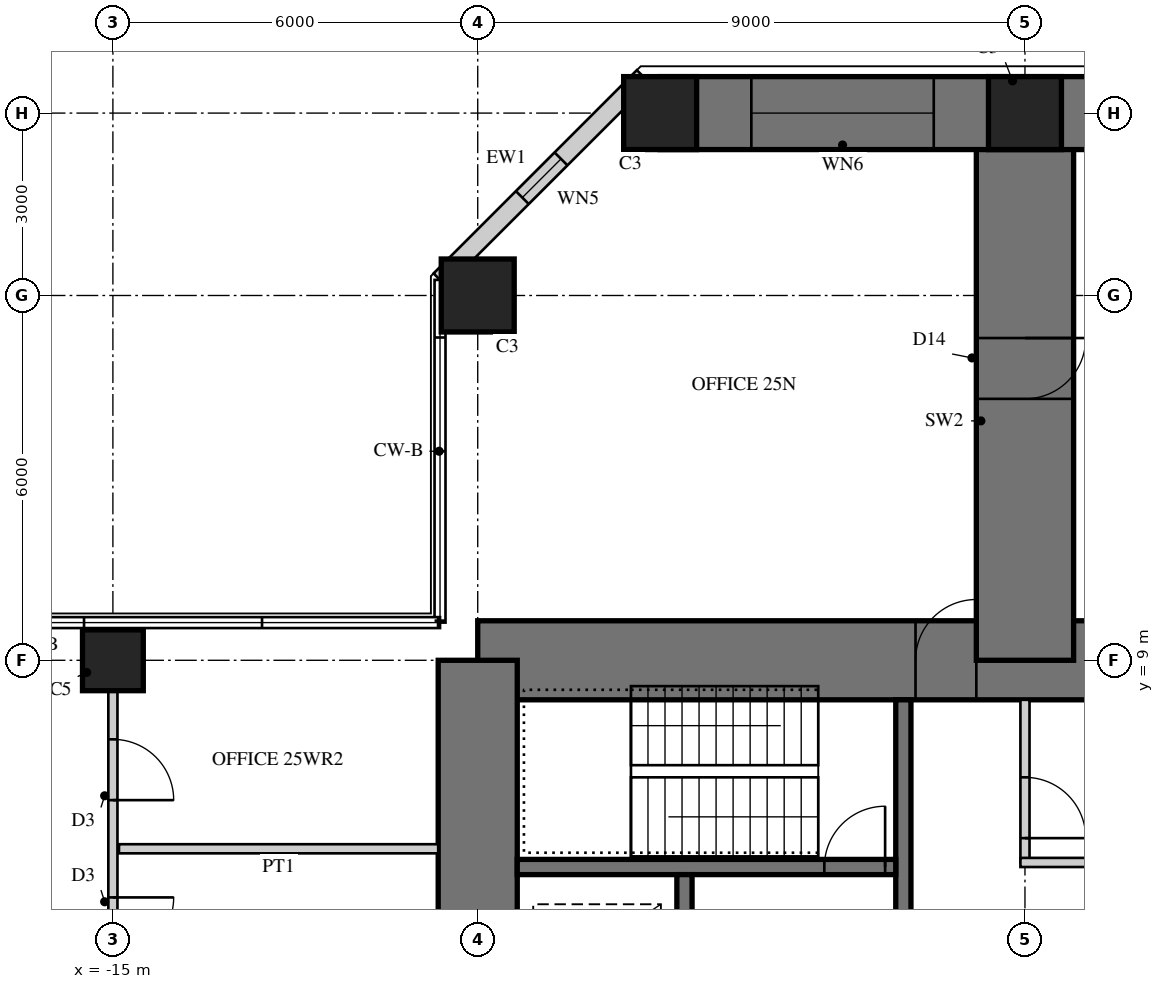
"""IFC4 building model, lengths in metres.
Left out: names, types, materials, properties, quantities, classifications, styles, units other than length and angle.
Written with IfcOpenShell. Run it as: python <this file> out.ifc"""

import sys

from ifc_helpers import new_model, si_unit, direction, frame, frame_2d, origin, origin_2d, place, context, subcontext, project, spatial, rectangle, hollow_rectangle, extrude, element, fill, save


model = new_model("IFC4")
c1 = context("Model", 3, precision=1e-05, world=origin(), true_north=direction((0.0, 1.0)))
c2 = subcontext(c1, "Body", "Model", "MODEL_VIEW")
j1 = project(units=[si_unit("LENGTHUNIT", "METRE"), si_unit("PLANEANGLEUNIT", "RADIAN")], contexts=[c1])
p1 = place(None, origin())
s1 = spatial("IfcSite", under=j1, at=p1, CompositionType="ELEMENT")
p2 = place(p1, origin())
s2 = spatial("IfcBuilding", under=s1, at=p2, CompositionType="ELEMENT")
p3 = place(p2, frame((0.0, 0.0, 104.5)))
s3 = spatial("IfcBuildingStorey", under=s2, at=p3, CompositionType="ELEMENT", Elevation=104.5)
p4 = place(p3, frame((9.0, 9.0, 0.0), z_axis=(0.0, 0.0, 1.0), x_axis=(-1.0, 0.0, 0.0)))
e1 = element("IfcWall", 1, at=p4, inside=s3, PredefinedType="SHEAR", context=c2, shape_type="SweptSolid", body=[
    extrude(rectangle(XDim=18.0, YDim=1.3, at=frame_2d((9.0, 0.0))), origin(), (0.0, 0.0, 1.0), 4.0),
])
p5 = place(p4, frame((9.8, 0.0, 0.0)))
e2 = element("IfcOpeningElement", 2, at=p5, cuts=e1, PredefinedType="OPENING", context=c2, shape_type="SweptSolid", body=[
    extrude(rectangle(XDim=1.0, YDim=2.4, at=frame_2d((0.5, 1.2))), frame((0.0, 0.66, 0.0), z_axis=(0.0, -1.0, 0.0), x_axis=(1.0, 0.0, 0.0)), (0.0, 0.0, 1.0), 1.32),
])
p6 = place(p3, frame((-9.0, 9.0, 0.0), z_axis=(0.0, 0.0, 1.0), x_axis=(0.0, -1.0, 0.0)))
e3 = element("IfcWall", 3, at=p6, inside=s3, PredefinedType="SHEAR", context=c2, shape_type="SweptSolid", body=[
    extrude(rectangle(XDim=18.0, YDim=1.3, at=frame_2d((9.0, 0.0))), origin(), (0.0, 0.0, 1.0), 4.0),
])
p7 = place(p6, frame((9.8, 0.0, 0.0)))
e4 = element("IfcOpeningElement", 4, at=p7, cuts=e3, PredefinedType="OPENING", context=c2, shape_type="SweptSolid", body=[
    extrude(rectangle(XDim=1.0, YDim=2.4, at=frame_2d((0.5, 1.2))), frame((0.0, 0.66, 0.0), z_axis=(0.0, -1.0, 0.0), x_axis=(1.0, 0.0, 0.0)), (0.0, 0.0, 1.0), 1.32),
])
p8 = place(p3, frame((-2.0, 1.675, 0.0), z_axis=(0.0, 0.0, 1.0), x_axis=(0.0, 1.0, 0.0)))
e5 = element("IfcWall", 5, at=p8, inside=s3, PredefinedType="SHEAR", context=c2, shape_type="SweptSolid", body=[
    extrude(rectangle(XDim=6.675, YDim=0.25, at=frame_2d((3.337, 0.0))), origin(), (0.0, 0.0, 1.0), 4.0),
])
p9 = place(p8, frame((0.725, 0.0, 0.0)))
e6 = element("IfcOpeningElement", 6, at=p9, cuts=e5, PredefinedType="OPENING", context=c2, shape_type="SweptSolid", body=[
    extrude(rectangle(XDim=1.0, YDim=2.1, at=frame_2d((0.5, 1.05))), frame((0.0, 0.135, 0.0), z_axis=(0.0, -1.0, 0.0), x_axis=(1.0, 0.0, 0.0)), (0.0, 0.0, 1.0), 0.27),
])
p10 = place(p3, frame((-2.125, 5.6, 0.0), z_axis=(0.0, 0.0, 1.0), x_axis=(-1.0, 0.0, 0.0)))
e7 = element("IfcWall", 7, at=p10, inside=s3, PredefinedType="SHEAR", context=c2, shape_type="SweptSolid", body=[
    extrude(rectangle(XDim=6.225, YDim=0.25, at=frame_2d((3.113, 0.0))), origin(), (0.0, 0.0, 1.0), 4.0),
])
p11 = place(p10, frame((0.175, 0.0, 0.0)))
e8 = element("IfcOpeningElement", 8, at=p11, cuts=e7, PredefinedType="OPENING", context=c2, shape_type="SweptSolid", body=[
    extrude(rectangle(XDim=1.0, YDim=2.1, at=frame_2d((0.5, 1.05))), frame((0.0, 0.135, 0.0), z_axis=(0.0, -1.0, 0.0), x_axis=(1.0, 0.0, 0.0)), (0.0, 0.0, 1.0), 0.27),
])
p12 = place(p3, frame((-5.6, 1.925, 0.0), z_axis=(0.0, 0.0, 1.0), x_axis=(0.0, 1.0, 0.0)))
e9 = element("IfcWall", 9, at=p12, inside=s3, PredefinedType="SHEAR", context=c2, shape_type="SweptSolid", body=[
    extrude(rectangle(XDim=3.55, YDim=0.25, at=frame_2d((1.775, 0.0))), origin(), (0.0, 0.0, 1.0), 4.0),
])
p13 = place(p12, frame((1.525, 0.0, 0.0)))
e10 = element("IfcOpeningElement", 10, at=p13, cuts=e9, PredefinedType="OPENING", context=c2, shape_type="SweptSolid", body=[
    extrude(rectangle(XDim=1.1, YDim=2.2, at=frame_2d((0.55, 1.1))), frame((0.0, 0.135, 0.0), z_axis=(0.0, -1.0, 0.0), x_axis=(1.0, 0.0, 0.0)), (0.0, 0.0, 1.0), 0.27),
])
p14 = place(p12, frame((0.075, 0.0, 0.0)))
e11 = element("IfcOpeningElement", 11, at=p14, cuts=e9, PredefinedType="OPENING", context=c2, shape_type="SweptSolid", body=[
    extrude(rectangle(XDim=0.8, YDim=2.1, at=frame_2d((0.4, 1.05))), frame((0.0, 0.135, 0.0), z_axis=(0.0, -1.0, 0.0), x_axis=(1.0, 0.0, 0.0)), (0.0, 0.0, 1.0), 0.27),
])
p15 = place(p3, frame((0.0, 9.0, 0.0), z_axis=(0.0, 0.0, 1.0), x_axis=(0.0, 1.0, 0.0)))
e12 = element("IfcWall", 12, at=p15, inside=s3, PredefinedType="SHEAR", context=c2, shape_type="SweptSolid", body=[
    extrude(rectangle(XDim=9.0, YDim=1.6, at=frame_2d((4.5, 0.0))), origin(), (0.0, 0.0, 1.0), 4.0),
])
p16 = place(p15, frame((4.3, 0.0, 0.0)))
e13 = element("IfcOpeningElement", 13, at=p16, cuts=e12, PredefinedType="OPENING", context=c2, shape_type="SweptSolid", body=[
    extrude(rectangle(XDim=1.0, YDim=2.2, at=frame_2d((0.5, 1.1))), frame((0.0, 0.81, 0.0), z_axis=(0.0, -1.0, 0.0), x_axis=(1.0, 0.0, 0.0)), (0.0, 0.0, 1.0), 1.62),
])
p17 = place(p3, frame((6.0, 18.0, 0.0), z_axis=(0.0, 0.0, 1.0), x_axis=(-1.0, 0.0, 0.0)))
e14 = element("IfcWall", 14, at=p17, inside=s3, PredefinedType="SHEAR", context=c2, shape_type="SweptSolid", body=[
    extrude(rectangle(XDim=12.0, YDim=1.2, at=frame_2d((6.0, 0.0))), origin(), (0.0, 0.0, 1.0), 4.0),
])
p18 = place(p17, frame((1.5, 0.0, 0.6)))
e15 = element("IfcOpeningElement", 15, at=p18, cuts=e14, PredefinedType="OPENING", context=c2, shape_type="SweptSolid", body=[
    extrude(rectangle(XDim=3.0, YDim=2.4, at=frame_2d((1.5, 1.2))), frame((0.0, 0.61, 0.0), z_axis=(0.0, -1.0, 0.0), x_axis=(1.0, 0.0, 0.0)), (0.0, 0.0, 1.0), 1.22),
])
p19 = place(p17, frame((7.5, 0.0, 0.6)))
e16 = element("IfcOpeningElement", 16, at=p19, cuts=e14, PredefinedType="OPENING", context=c2, shape_type="SweptSolid", body=[
    extrude(rectangle(XDim=3.0, YDim=2.4, at=frame_2d((1.5, 1.2))), frame((0.0, 0.61, 0.0), z_axis=(0.0, -1.0, 0.0), x_axis=(1.0, 0.0, 0.0)), (0.0, 0.0, 1.0), 1.22),
])
for number, where, z_axis, x_axis in (
    (17, (-9.0, 15.0, 0.0), (0.0, 0.0, 1.0), (1.0, 0.0, 0.0)),
    (18, (0.0, 18.0, 0.0), (0.0, 0.0, 1.0), (1.0, 0.0, 0.0)),
    (19, (-6.0, 18.0, 0.0), (0.0, 0.0, 1.0), (1.0, 0.0, 0.0)),
):
    element("IfcColumn", number, at=place(p3, frame(where, z_axis=z_axis, x_axis=x_axis)), inside=s3, PredefinedType="COLUMN", context=c2, shape_type="SweptSolid", body=[
        extrude(rectangle(XDim=1.2, YDim=1.2, at=origin_2d()), origin(), (0.0, 0.0, 1.0), 4.0),
    ])
p20 = place(p3, frame((-15.0, 9.0, 0.0), z_axis=(0.0, 0.0, 1.0), x_axis=(1.0, 0.0, 0.0)))
e20 = element("IfcColumn", 20, at=p20, inside=s3, PredefinedType="COLUMN", context=c2, shape_type="SweptSolid", body=[
    extrude(rectangle(XDim=1.0, YDim=1.0, at=origin_2d()), origin(), (0.0, 0.0, 1.0), 4.0),
])
p21 = place(p3, frame((-6.277, 18.6, 0.0), z_axis=(0.0, 0.0, 1.0), x_axis=(-0.707106781187, -0.707106781187, 0.0)))
e21 = element("IfcWall", 21, at=p21, inside=s3, PredefinedType="SOLIDWALL", context=c2, shape_type="SweptSolid", body=[
    extrude(rectangle(XDim=4.728, YDim=0.3, at=frame_2d((2.364, 0.0))), origin(), (0.0, 0.0, 1.0), 3.8),
])
p22 = place(p21, frame((1.914, 0.0, 0.3)))
e22 = element("IfcOpeningElement", 22, at=p22, cuts=e21, PredefinedType="OPENING", context=c2, shape_type="SweptSolid", body=[
    extrude(rectangle(XDim=0.9, YDim=2.4, at=frame_2d((0.45, 1.2))), frame((0.0, 0.16, 0.0), z_axis=(0.0, -1.0, 0.0), x_axis=(1.0, 0.0, 0.0)), (0.0, 0.0, 1.0), 0.32),
])
p23 = place(p3, frame((0.0, 5.675, 0.0), z_axis=(0.0, 0.0, 1.0), x_axis=(0.0, 1.0, 0.0)))
e23 = element("IfcWall", 23, at=p23, inside=s3, PredefinedType="PARTITIONING", context=c2, shape_type="SweptSolid", body=[
    extrude(rectangle(XDim=2.675, YDim=0.15, at=frame_2d((1.337, 0.0))), origin(), (0.0, 0.0, 1.0), 3.8),
])
p24 = place(p23, frame((0.4, 0.0, 0.0)))
e24 = element("IfcOpeningElement", 24, at=p24, cuts=e23, PredefinedType="OPENING", context=c2, shape_type="SweptSolid", body=[
    extrude(rectangle(XDim=1.0, YDim=2.1, at=frame_2d((0.5, 1.05))), frame((0.0, 0.085, 0.0), z_axis=(0.0, -1.0, 0.0), x_axis=(1.0, 0.0, 0.0)), (0.0, 0.0, 1.0), 0.17),
])
p25 = place(p3, frame((1.675, 5.675, 0.0), z_axis=(0.0, 0.0, 1.0), x_axis=(-1.0, 0.0, 0.0)))
e25 = element("IfcWall", 25, at=p25, inside=s3, PredefinedType="PARTITIONING", context=c2, shape_type="SweptSolid", body=[
    extrude(rectangle(XDim=1.75, YDim=0.15, at=frame_2d((0.875, 0.0))), origin(), (0.0, 0.0, 1.0), 3.8),
])
p26 = place(p3, frame((-15.0, 8.5, 0.0), z_axis=(0.0, 0.0, 1.0), x_axis=(0.0, -1.0, 0.0)))
e26 = element("IfcWall", 26, at=p26, inside=s3, PredefinedType="PARTITIONING", context=c2, shape_type="SweptSolid", body=[
    extrude(rectangle(XDim=7.9, YDim=0.15, at=frame_2d((3.95, 0.0))), origin(), (0.0, 0.0, 1.0), 3.0),
])
p27 = place(p26, frame((0.8, 0.0, 0.0)))
e27 = element("IfcOpeningElement", 27, at=p27, cuts=e26, PredefinedType="OPENING", context=c2, shape_type="SweptSolid", body=[
    extrude(rectangle(XDim=1.0, YDim=2.1, at=frame_2d((0.5, 1.05))), frame((0.0, 0.085, 0.0), z_axis=(0.0, -1.0, 0.0), x_axis=(1.0, 0.0, 0.0)), (0.0, 0.0, 1.0), 0.17),
])
p28 = place(p26, frame((3.4, 0.0, 0.0)))
e28 = element("IfcOpeningElement", 28, at=p28, cuts=e26, PredefinedType="OPENING", context=c2, shape_type="SweptSolid", body=[
    extrude(rectangle(XDim=1.0, YDim=2.1, at=frame_2d((0.5, 1.05))), frame((0.0, 0.085, 0.0), z_axis=(0.0, -1.0, 0.0), x_axis=(1.0, 0.0, 0.0)), (0.0, 0.0, 1.0), 0.17),
])
p29 = place(p26, frame((6.05, 0.0, 0.0)))
e29 = element("IfcOpeningElement", 29, at=p29, cuts=e26, PredefinedType="OPENING", context=c2, shape_type="SweptSolid", body=[
    extrude(rectangle(XDim=1.0, YDim=2.1, at=frame_2d((0.5, 1.05))), frame((0.0, 0.085, 0.0), z_axis=(0.0, -1.0, 0.0), x_axis=(1.0, 0.0, 0.0)), (0.0, 0.0, 1.0), 0.17),
])
p30 = place(p3, frame((-9.65, 5.9, 0.0), z_axis=(0.0, 0.0, 1.0), x_axis=(-1.0, 0.0, 0.0)))
e30 = element("IfcWall", 30, at=p30, inside=s3, PredefinedType="PARTITIONING", context=c2, shape_type="SweptSolid", body=[
    extrude(rectangle(XDim=5.25, YDim=0.15, at=frame_2d((2.625, 0.0))), origin(), (0.0, 0.0, 1.0), 3.1),
])
p31 = place(p19, origin())
e31 = element("IfcWindow", 31, at=p31, inside=s3, PartitioningType="SINGLE_PANEL", PredefinedType="WINDOW", context=c2, shape_type="SweptSolid", body=[
    extrude(hollow_rectangle(XDim=3.0, YDim=2.4, WallThickness=0.06, at=frame_2d((1.5, 1.2))), frame((0.0, 0.03, 0.0), z_axis=(0.0, -1.0, 0.0), x_axis=(1.0, 0.0, 0.0)), (0.0, 0.0, 1.0), 0.06),
    extrude(rectangle(XDim=2.879, YDim=2.279, at=frame_2d((1.5, 1.2))), frame((0.0, 0.03, 0.0), z_axis=(0.0, -1.0, 0.0), x_axis=(1.0, 0.0, 0.0)), (0.0, 0.0, 1.0), 0.06),
])
fill(e16, e31)
p32 = place(p22, origin())
e32 = element("IfcWindow", 32, at=p32, inside=s3, PartitioningType="SINGLE_PANEL", PredefinedType="WINDOW", context=c2, shape_type="SweptSolid", body=[
    extrude(hollow_rectangle(XDim=0.9, YDim=2.4, WallThickness=0.06, at=frame_2d((0.45, 1.2))), frame((0.0, 0.03, 0.0), z_axis=(0.0, -1.0, 0.0), x_axis=(1.0, 0.0, 0.0)), (0.0, 0.0, 1.0), 0.06),
    extrude(rectangle(XDim=0.779, YDim=2.279, at=frame_2d((0.45, 1.2))), frame((0.0, 0.03, 0.0), z_axis=(0.0, -1.0, 0.0), x_axis=(1.0, 0.0, 0.0)), (0.0, 0.0, 1.0), 0.06),
])
fill(e22, e32)
p33 = place(p24, frame((1.0, 0.0, 0.0), z_axis=(0.0, 0.0, 1.0), x_axis=(-1.0, 0.0, 0.0)))
e33 = element("IfcDoor", 33, at=p33, inside=s3, OperationType="SINGLE_SWING_RIGHT", PredefinedType="DOOR", context=c2, shape_type="SweptSolid", body=[
    extrude(rectangle(XDim=1.0, YDim=2.1, at=frame_2d((0.5, 1.05))), frame((0.0, 0.025, 0.0), z_axis=(0.0, -1.0, 0.0), x_axis=(1.0, 0.0, 0.0)), (0.0, 0.0, 1.0), 0.05),
])
fill(e24, e33)
p34 = place(p27, origin())
e34 = element("IfcDoor", 34, at=p34, inside=s3, OperationType="SINGLE_SWING_RIGHT", PredefinedType="DOOR", context=c2, shape_type="SweptSolid", body=[
    extrude(rectangle(XDim=1.0, YDim=2.1, at=frame_2d((0.5, 1.05))), frame((0.0, 0.025, 0.0), z_axis=(0.0, -1.0, 0.0), x_axis=(1.0, 0.0, 0.0)), (0.0, 0.0, 1.0), 0.05),
])
fill(e27, e34)
p35 = place(p28, origin())
e35 = element("IfcDoor", 35, at=p35, inside=s3, OperationType="SINGLE_SWING_LEFT", PredefinedType="DOOR", context=c2, shape_type="SweptSolid", body=[
    extrude(rectangle(XDim=1.0, YDim=2.1, at=frame_2d((0.5, 1.05))), frame((0.0, 0.025, 0.0), z_axis=(0.0, -1.0, 0.0), x_axis=(1.0, 0.0, 0.0)), (0.0, 0.0, 1.0), 0.05),
])
fill(e28, e35)
p36 = place(p16, frame((1.0, 0.0, 0.0), z_axis=(0.0, 0.0, 1.0), x_axis=(-1.0, 0.0, 0.0)))
e36 = element("IfcDoor", 36, at=p36, inside=s3, OperationType="SINGLE_SWING_LEFT", PredefinedType="DOOR", context=c2, shape_type="SweptSolid", body=[
    extrude(rectangle(XDim=1.0, YDim=2.2, at=frame_2d((0.5, 1.1))), frame((0.0, 0.025, 0.0), z_axis=(0.0, -1.0, 0.0), x_axis=(1.0, 0.0, 0.0)), (0.0, 0.0, 1.0), 0.05),
])
fill(e13, e36)
p37 = place(p5, frame((1.0, 0.0, 0.0), z_axis=(0.0, 0.0, 1.0), x_axis=(-1.0, 0.0, 0.0)))
e37 = element("IfcDoor", 37, at=p37, inside=s3, OperationType="SINGLE_SWING_RIGHT", PredefinedType="DOOR", context=c2, shape_type="SweptSolid", body=[
    extrude(rectangle(XDim=1.0, YDim=2.4, at=frame_2d((0.5, 1.2))), frame((0.0, -0.005, 0.0), z_axis=(0.0, -1.0, 0.0), x_axis=(1.0, 0.0, 0.0)), (0.0, 0.0, 1.0), 0.05),
])
fill(e2, e37)
p38 = place(p11, frame((1.0, 0.0, 0.0), z_axis=(0.0, 0.0, 1.0), x_axis=(-1.0, 0.0, 0.0)))
e38 = element("IfcDoor", 38, at=p38, inside=s3, OperationType="SINGLE_SWING_RIGHT", PredefinedType="DOOR", context=c2, shape_type="SweptSolid", body=[
    extrude(rectangle(XDim=1.0, YDim=2.1, at=frame_2d((0.5, 1.05))), frame((0.0, 0.025, 0.0), z_axis=(0.0, -1.0, 0.0), x_axis=(1.0, 0.0, 0.0)), (0.0, 0.0, 1.0), 0.05),
])
fill(e8, e38)
save(model, sys.argv[1])
